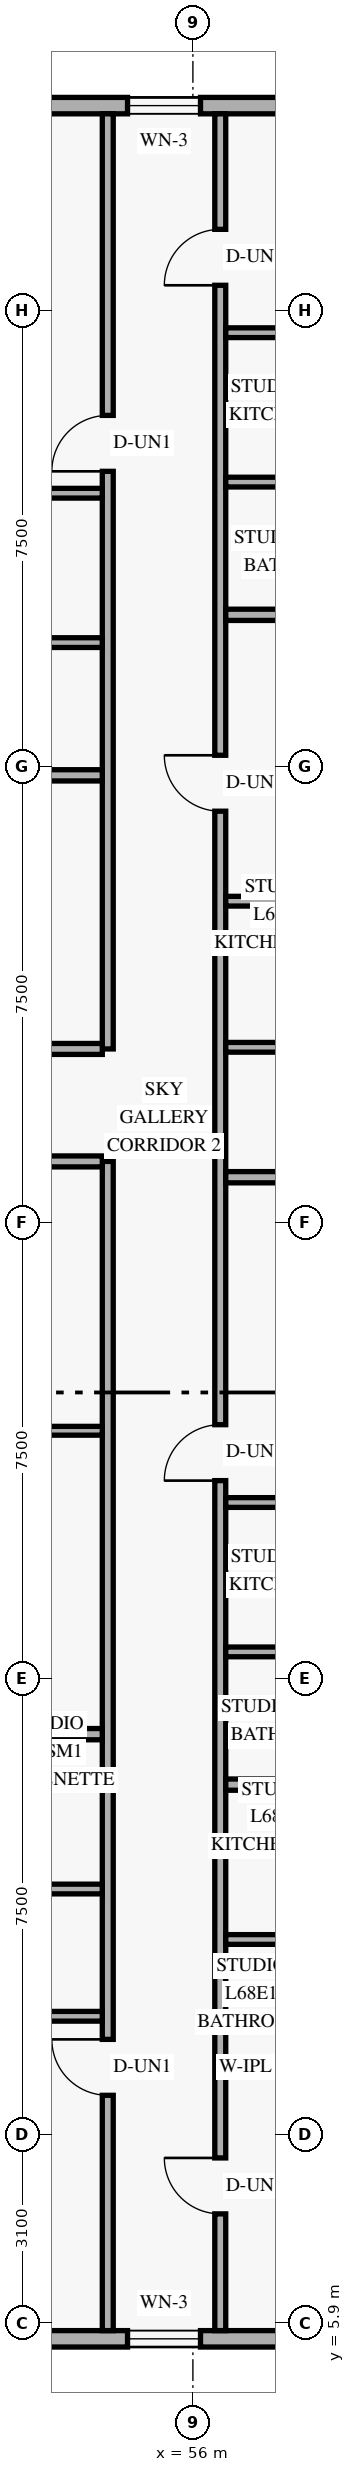
"""IFC4 building model, lengths in metres.
Left out: names, types, materials, properties, quantities, classifications, styles, units other than length and angle.
Written with IfcOpenShell. Run it as: python <this file> out.ifc"""

import sys

from ifc_helpers import new_model, si_unit, direction, frame, frame_2d, origin, place, context, subcontext, project, spatial, rectangle, extrude, element, fill, save


model = new_model("IFC4")
c1 = context("Model", 3, precision=1e-05, world=origin(), true_north=direction((0.0, 1.0)))
c2 = subcontext(c1, "Body", "Model", "MODEL_VIEW")
j1 = project(units=[si_unit("LENGTHUNIT", "METRE"), si_unit("PLANEANGLEUNIT", "RADIAN")], contexts=[c1])
p1 = place(None, origin())
s1 = spatial("IfcSite", under=j1, at=p1, CompositionType="ELEMENT")
p2 = place(p1, origin())
s2 = spatial("IfcBuilding", under=s1, at=p2, CompositionType="ELEMENT")
p3 = place(p2, frame((0.0, 0.0, 260.4)))
s3 = spatial("IfcBuildingStorey", under=s2, at=p3, CompositionType="ELEMENT", Elevation=260.4)
p4 = place(p3, frame((25.82, 5.635, 0.0), z_axis=(0.0, 0.0, 1.0), x_axis=(1.0, 0.0, 0.0)))
e1 = element("IfcWall", 1, at=p4, inside=s3, PredefinedType="SOLIDWALL", context=c2, shape_type="SweptSolid", body=[
    extrude(rectangle(XDim=32.96, YDim=0.27, at=frame_2d((16.48, 0.0))), origin(), (0.0, 0.0, 1.0), 3.36),
])
p5 = place(p4, frame((14.212, 0.0, 0.85)))
e2 = element("IfcOpeningElement", 2, at=p5, cuts=e1, PredefinedType="OPENING", context=c2, shape_type="SweptSolid", body=[
    extrude(rectangle(XDim=1.65, YDim=1.6, at=frame_2d((0.825, 0.8))), frame((0.0, 0.145, 0.0), z_axis=(0.0, -1.0, 0.0), x_axis=(1.0, 0.0, 0.0)), (0.0, 0.0, 1.0), 0.29),
])
p6 = place(p4, frame((25.431, 0.0, 0.85)))
e3 = element("IfcOpeningElement", 3, at=p6, cuts=e1, PredefinedType="OPENING", context=c2, shape_type="SweptSolid", body=[
    extrude(rectangle(XDim=1.65, YDim=1.6, at=frame_2d((0.825, 0.8))), frame((0.0, 0.145, 0.0), z_axis=(0.0, -1.0, 0.0), x_axis=(1.0, 0.0, 0.0)), (0.0, 0.0, 1.0), 0.29),
])
p7 = place(p4, frame((29.105, 0.0, 0.85)))
e4 = element("IfcOpeningElement", 4, at=p7, cuts=e1, PredefinedType="OPENING", context=c2, shape_type="SweptSolid", body=[
    extrude(rectangle(XDim=1.2, YDim=1.5, at=frame_2d((0.6, 0.75))), frame((0.0, 0.145, 0.0), z_axis=(0.0, -1.0, 0.0), x_axis=(1.0, 0.0, 0.0)), (0.0, 0.0, 1.0), 0.29),
])
p8 = place(p3, frame((58.78, 42.365, 0.0), z_axis=(0.0, 0.0, 1.0), x_axis=(-1.0, 0.0, 0.0)))
e5 = element("IfcWall", 5, at=p8, inside=s3, PredefinedType="SOLIDWALL", context=c2, shape_type="SweptSolid", body=[
    extrude(rectangle(XDim=32.96, YDim=0.27, at=frame_2d((16.48, 0.0))), origin(), (0.0, 0.0, 1.0), 3.36),
])
p9 = place(p8, frame((27.665, 0.0, 0.85)))
e6 = element("IfcOpeningElement", 6, at=p9, cuts=e5, PredefinedType="OPENING", context=c2, shape_type="SweptSolid", body=[
    extrude(rectangle(XDim=1.65, YDim=1.6, at=frame_2d((0.825, 0.8))), frame((0.0, 0.145, 0.0), z_axis=(0.0, -1.0, 0.0), x_axis=(1.0, 0.0, 0.0)), (0.0, 0.0, 1.0), 0.29),
])
p10 = place(p8, frame((14.569, 0.0, 0.85)))
e7 = element("IfcOpeningElement", 7, at=p10, cuts=e5, PredefinedType="OPENING", context=c2, shape_type="SweptSolid", body=[
    extrude(rectangle(XDim=1.65, YDim=1.6, at=frame_2d((0.825, 0.8))), frame((0.0, 0.145, 0.0), z_axis=(0.0, -1.0, 0.0), x_axis=(1.0, 0.0, 0.0)), (0.0, 0.0, 1.0), 0.29),
])
p11 = place(p8, frame((2.655, 0.0, 0.85)))
e8 = element("IfcOpeningElement", 8, at=p11, cuts=e5, PredefinedType="OPENING", context=c2, shape_type="SweptSolid", body=[
    extrude(rectangle(XDim=1.2, YDim=1.5, at=frame_2d((0.6, 0.75))), frame((0.0, 0.145, 0.0), z_axis=(0.0, -1.0, 0.0), x_axis=(1.0, 0.0, 0.0)), (0.0, 0.0, 1.0), 0.29),
])
p12 = place(p3, frame((54.6, 5.77, 0.0), z_axis=(0.0, 0.0, 1.0), x_axis=(0.0, 1.0, 0.0)))
e9 = element("IfcWall", 9, at=p12, inside=s3, PredefinedType="STANDARD", context=c2, shape_type="SweptSolid", body=[
    extrude(rectangle(XDim=19.23, YDim=0.18, at=frame_2d((9.615, 0.0))), origin(), (0.0, 0.0, 1.0), 2.803),
])
p13 = place(p12, frame((3.87, 0.0, 0.0)))
e10 = element("IfcOpeningElement", 10, at=p13, cuts=e9, PredefinedType="OPENING", context=c2, shape_type="SweptSolid", body=[
    extrude(rectangle(XDim=0.92, YDim=2.15, at=frame_2d((0.46, 1.075))), frame((0.0, 0.1, 0.0), z_axis=(0.0, -1.0, 0.0), x_axis=(1.0, 0.0, 0.0)), (0.0, 0.0, 1.0), 0.2),
])
p14 = place(p3, frame((54.6, 26.85, 0.0), z_axis=(0.0, 0.0, 1.0), x_axis=(0.0, 1.0, 0.0)))
e11 = element("IfcWall", 11, at=p14, inside=s3, PredefinedType="STANDARD", context=c2, shape_type="SweptSolid", body=[
    extrude(rectangle(XDim=15.38, YDim=0.18, at=frame_2d((7.69, 0.0))), origin(), (0.0, 0.0, 1.0), 2.803),
])
p15 = place(p14, frame((9.5, 0.0, 0.0)))
e12 = element("IfcOpeningElement", 12, at=p15, cuts=e11, PredefinedType="OPENING", context=c2, shape_type="SweptSolid", body=[
    extrude(rectangle(XDim=0.92, YDim=2.15, at=frame_2d((0.46, 1.075))), frame((0.0, 0.1, 0.0), z_axis=(0.0, -1.0, 0.0), x_axis=(1.0, 0.0, 0.0)), (0.0, 0.0, 1.0), 0.2),
])
p16 = place(p3, frame((37.64, 25.0, 0.0), z_axis=(0.0, 0.0, 1.0), x_axis=(1.0, 0.0, 0.0)))
e13 = element("IfcWall", 13, at=p16, inside=s3, PredefinedType="STANDARD", context=c2, shape_type="SweptSolid", body=[
    extrude(rectangle(XDim=16.87, YDim=0.18, at=frame_2d((8.435, 0.0))), origin(), (0.0, 0.0, 1.0), 2.803),
])
p17 = place(p16, frame((0.32, 0.0, 0.0)))
e14 = element("IfcOpeningElement", 14, at=p17, cuts=e13, PredefinedType="OPENING", context=c2, shape_type="SweptSolid", body=[
    extrude(rectangle(XDim=0.92, YDim=2.15, at=frame_2d((0.46, 1.075))), frame((0.0, 0.1, 0.0), z_axis=(0.0, -1.0, 0.0), x_axis=(1.0, 0.0, 0.0)), (0.0, 0.0, 1.0), 0.2),
])
p18 = place(p3, frame((37.64, 26.85, 0.0), z_axis=(0.0, 0.0, 1.0), x_axis=(1.0, 0.0, 0.0)))
e15 = element("IfcWall", 15, at=p18, inside=s3, PredefinedType="STANDARD", context=c2, shape_type="SweptSolid", body=[
    extrude(rectangle(XDim=16.87, YDim=0.18, at=frame_2d((8.435, 0.0))), origin(), (0.0, 0.0, 1.0), 2.803),
])
p19 = place(p18, frame((7.975, 0.0, 0.0)))
e16 = element("IfcOpeningElement", 16, at=p19, cuts=e15, PredefinedType="OPENING", context=c2, shape_type="SweptSolid", body=[
    extrude(rectangle(XDim=0.92, YDim=2.15, at=frame_2d((0.46, 1.075))), frame((0.0, 0.1, 0.0), z_axis=(0.0, -1.0, 0.0), x_axis=(1.0, 0.0, 0.0)), (0.0, 0.0, 1.0), 0.2),
])
p20 = place(p3, frame((56.45, 5.77, 0.0), z_axis=(0.0, 0.0, 1.0), x_axis=(0.0, 1.0, 0.0)))
e17 = element("IfcWall", 17, at=p20, inside=s3, PredefinedType="STANDARD", context=c2, shape_type="SweptSolid", body=[
    extrude(rectangle(XDim=36.46, YDim=0.18, at=frame_2d((18.23, 0.0))), origin(), (0.0, 0.0, 1.0), 2.803),
])
p21 = place(p20, frame((1.92, 0.0, 0.0)))
e18 = element("IfcOpeningElement", 18, at=p21, cuts=e17, PredefinedType="OPENING", context=c2, shape_type="SweptSolid", body=[
    extrude(rectangle(XDim=0.92, YDim=2.15, at=frame_2d((0.46, 1.075))), frame((0.0, 0.1, 0.0), z_axis=(0.0, -1.0, 0.0), x_axis=(1.0, 0.0, 0.0)), (0.0, 0.0, 1.0), 0.2),
])
p22 = place(p20, frame((13.98, 0.0, 0.0)))
e19 = element("IfcOpeningElement", 19, at=p22, cuts=e17, PredefinedType="OPENING", context=c2, shape_type="SweptSolid", body=[
    extrude(rectangle(XDim=0.92, YDim=2.15, at=frame_2d((0.46, 1.075))), frame((0.0, 0.1, 0.0), z_axis=(0.0, -1.0, 0.0), x_axis=(1.0, 0.0, 0.0)), (0.0, 0.0, 1.0), 0.2),
])
p23 = place(p20, frame((24.99, 0.0, 0.0)))
e20 = element("IfcOpeningElement", 20, at=p23, cuts=e17, PredefinedType="OPENING", context=c2, shape_type="SweptSolid", body=[
    extrude(rectangle(XDim=0.92, YDim=2.15, at=frame_2d((0.46, 1.075))), frame((0.0, 0.1, 0.0), z_axis=(0.0, -1.0, 0.0), x_axis=(1.0, 0.0, 0.0)), (0.0, 0.0, 1.0), 0.2),
])
p24 = place(p20, frame((33.64, 0.0, 0.0)))
e21 = element("IfcOpeningElement", 21, at=p24, cuts=e17, PredefinedType="OPENING", context=c2, shape_type="SweptSolid", body=[
    extrude(rectangle(XDim=0.92, YDim=2.15, at=frame_2d((0.46, 1.075))), frame((0.0, 0.1, 0.0), z_axis=(0.0, -1.0, 0.0), x_axis=(1.0, 0.0, 0.0)), (0.0, 0.0, 1.0), 0.2),
])
p25 = place(p3, frame((56.54, 10.11, 0.0), z_axis=(0.0, 0.0, 1.0), x_axis=(1.0, 0.0, 0.0)))
e22 = element("IfcWall", 22, at=p25, inside=s3, PredefinedType="PLUMBINGWALL", context=c2, shape_type="SweptSolid", body=[
    extrude(rectangle(XDim=2.606, YDim=0.16, at=frame_2d((1.303, 0.0))), origin(), (0.0, 0.0, 1.0), 2.879),
])
p26 = place(p3, frame((56.54, 12.203, 0.0), z_axis=(0.0, 0.0, 1.0), x_axis=(1.0, 0.0, 0.0)))
e23 = element("IfcWall", 23, at=p26, inside=s3, PredefinedType="PLUMBINGWALL", context=c2, shape_type="SweptSolid", body=[
    extrude(rectangle(XDim=2.446, YDim=0.16, at=frame_2d((1.223, 0.0))), origin(), (0.0, 0.0, 1.0), 2.879),
])
p27 = place(p3, frame((56.54, 14.75, 0.0), z_axis=(0.0, 0.0, 1.0), x_axis=(1.0, 0.0, 0.0)))
e24 = element("IfcWall", 24, at=p27, inside=s3, PredefinedType="PARTITIONING", context=c2, shape_type="SweptSolid", body=[
    extrude(rectangle(XDim=5.59, YDim=0.185, at=frame_2d((2.795, 0.0))), origin(), (0.0, 0.0, 1.0), 2.879),
])
p28 = place(p3, frame((56.54, 19.39, 0.0), z_axis=(0.0, 0.0, 1.0), x_axis=(1.0, 0.0, 0.0)))
e25 = element("IfcWall", 25, at=p28, inside=s3, PredefinedType="PLUMBINGWALL", context=c2, shape_type="SweptSolid", body=[
    extrude(rectangle(XDim=3.62, YDim=0.16, at=frame_2d((1.81, 0.0))), origin(), (0.0, 0.0, 1.0), 2.879),
])
p29 = place(p3, frame((56.54, 16.933, 0.0), z_axis=(0.0, 0.0, 1.0), x_axis=(1.0, 0.0, 0.0)))
e26 = element("IfcWall", 26, at=p29, inside=s3, PredefinedType="PLUMBINGWALL", context=c2, shape_type="SweptSolid", body=[
    extrude(rectangle(XDim=3.46, YDim=0.16, at=frame_2d((1.73, 0.0))), origin(), (0.0, 0.0, 1.0), 2.879),
])
p30 = place(p3, frame((56.54, 24.74, 0.0), z_axis=(0.0, 0.0, 1.0), x_axis=(1.0, 0.0, 0.0)))
e27 = element("IfcWall", 27, at=p30, inside=s3, PredefinedType="PARTITIONING", context=c2, shape_type="SweptSolid", body=[
    extrude(rectangle(XDim=5.59, YDim=0.185, at=frame_2d((2.795, 0.0))), origin(), (0.0, 0.0, 1.0), 2.879),
])
p31 = place(p3, frame((56.54, 29.28, 0.0), z_axis=(0.0, 0.0, 1.0), x_axis=(1.0, 0.0, 0.0)))
e28 = element("IfcWall", 28, at=p31, inside=s3, PredefinedType="PLUMBINGWALL", context=c2, shape_type="SweptSolid", body=[
    extrude(rectangle(XDim=2.758, YDim=0.16, at=frame_2d((1.379, 0.0))), origin(), (0.0, 0.0, 1.0), 2.879),
])
p32 = place(p3, frame((56.54, 26.877, 0.0), z_axis=(0.0, 0.0, 1.0), x_axis=(1.0, 0.0, 0.0)))
e29 = element("IfcWall", 29, at=p32, inside=s3, PredefinedType="PLUMBINGWALL", context=c2, shape_type="SweptSolid", body=[
    extrude(rectangle(XDim=2.598, YDim=0.16, at=frame_2d((1.299, 0.0))), origin(), (0.0, 0.0, 1.0), 2.879),
])
p33 = place(p3, frame((56.54, 33.99, 0.0), z_axis=(0.0, 0.0, 1.0), x_axis=(1.0, 0.0, 0.0)))
e30 = element("IfcWall", 30, at=p33, inside=s3, PredefinedType="PARTITIONING", context=c2, shape_type="SweptSolid", body=[
    extrude(rectangle(XDim=5.59, YDim=0.185, at=frame_2d((2.795, 0.0))), origin(), (0.0, 0.0, 1.0), 2.879),
])
p34 = place(p3, frame((56.54, 38.63, 0.0), z_axis=(0.0, 0.0, 1.0), x_axis=(1.0, 0.0, 0.0)))
e31 = element("IfcWall", 31, at=p34, inside=s3, PredefinedType="PLUMBINGWALL", context=c2, shape_type="SweptSolid", body=[
    extrude(rectangle(XDim=3.62, YDim=0.16, at=frame_2d((1.81, 0.0))), origin(), (0.0, 0.0, 1.0), 2.803),
])
p35 = place(p3, frame((56.54, 36.173, 0.0), z_axis=(0.0, 0.0, 1.0), x_axis=(1.0, 0.0, 0.0)))
e32 = element("IfcWall", 32, at=p35, inside=s3, PredefinedType="PLUMBINGWALL", context=c2, shape_type="SweptSolid", body=[
    extrude(rectangle(XDim=3.46, YDim=0.16, at=frame_2d((1.73, 0.0))), origin(), (0.0, 0.0, 1.0), 2.879),
])
p36 = place(p3, frame((37.64, 15.58, 0.0), z_axis=(0.0, 0.0, 1.0), x_axis=(1.0, 0.0, 0.0)))
e33 = element("IfcWall", 33, at=p36, inside=s3, PredefinedType="PARTITIONING", context=c2, shape_type="SweptSolid", body=[
    extrude(rectangle(XDim=16.87, YDim=0.185, at=frame_2d((8.435, 0.0))), origin(), (0.0, 0.0, 1.0), 2.803),
])
p37 = place(p3, frame((51.98, 10.94, 0.0), z_axis=(0.0, 0.0, 1.0), x_axis=(1.0, 0.0, 0.0)))
e34 = element("IfcWall", 34, at=p37, inside=s3, PredefinedType="PLUMBINGWALL", context=c2, shape_type="SweptSolid", body=[
    extrude(rectangle(XDim=2.53, YDim=0.16, at=frame_2d((1.265, 0.0))), origin(), (0.0, 0.0, 1.0), 3.36),
])
p38 = place(p3, frame((52.14, 13.033, 0.0), z_axis=(0.0, 0.0, 1.0), x_axis=(1.0, 0.0, 0.0)))
e35 = element("IfcWall", 35, at=p38, inside=s3, PredefinedType="PLUMBINGWALL", context=c2, shape_type="SweptSolid", body=[
    extrude(rectangle(XDim=2.37, YDim=0.16, at=frame_2d((1.185, 0.0))), origin(), (0.0, 0.0, 1.0), 3.36),
])
p39 = place(p3, frame((51.29, 20.57, 0.0), z_axis=(0.0, 0.0, 1.0), x_axis=(1.0, 0.0, 0.0)))
e36 = element("IfcWall", 36, at=p39, inside=s3, PredefinedType="PARTITIONING", context=c2, shape_type="SweptSolid", body=[
    extrude(rectangle(XDim=3.22, YDim=0.145, at=frame_2d((1.61, 0.0))), origin(), (0.0, 0.0, 1.0), 3.36),
])
p40 = place(p3, frame((38.173, 31.35, 0.0), z_axis=(0.0, 0.0, 1.0), x_axis=(1.0, 0.0, 0.0)))
e37 = element("IfcWall", 37, at=p40, inside=s3, PredefinedType="PARTITIONING", context=c2, shape_type="SweptSolid", body=[
    extrude(rectangle(XDim=16.337, YDim=0.185, at=frame_2d((8.169, 0.0))), origin(), (0.0, 0.0, 1.0), 2.803),
])
p41 = place(p3, frame((51.904, 35.99, 0.0), z_axis=(0.0, 0.0, 1.0), x_axis=(1.0, 0.0, 0.0)))
e38 = element("IfcWall", 38, at=p41, inside=s3, PredefinedType="PLUMBINGWALL", context=c2, shape_type="SweptSolid", body=[
    extrude(rectangle(XDim=2.606, YDim=0.16, at=frame_2d((1.303, 0.0))), origin(), (0.0, 0.0, 1.0), 3.36),
])
p42 = place(p3, frame((52.064, 33.533, 0.0), z_axis=(0.0, 0.0, 1.0), x_axis=(1.0, 0.0, 0.0)))
e39 = element("IfcWall", 39, at=p42, inside=s3, PredefinedType="PLUMBINGWALL", context=c2, shape_type="SweptSolid", body=[
    extrude(rectangle(XDim=2.446, YDim=0.16, at=frame_2d((1.223, 0.0))), origin(), (0.0, 0.0, 1.0), 3.36),
])
p43 = place(p7, origin())
e40 = element("IfcWindow", 40, at=p43, inside=s3, PartitioningType="SINGLE_PANEL", PredefinedType="WINDOW", context=c2, shape_type="SweptSolid", body=[
    extrude(rectangle(XDim=1.2, YDim=1.5, at=frame_2d((0.6, 0.75))), frame((0.0, 0.03, 0.0), z_axis=(0.0, -1.0, 0.0), x_axis=(1.0, 0.0, 0.0)), (0.0, 0.0, 1.0), 0.06),
])
fill(e4, e40)
p44 = place(p11, origin())
e41 = element("IfcWindow", 41, at=p44, inside=s3, PartitioningType="SINGLE_PANEL", PredefinedType="WINDOW", context=c2, shape_type="SweptSolid", body=[
    extrude(rectangle(XDim=1.2, YDim=1.5, at=frame_2d((0.6, 0.75))), frame((0.0, 0.03, 0.0), z_axis=(0.0, -1.0, 0.0), x_axis=(1.0, 0.0, 0.0)), (0.0, 0.0, 1.0), 0.06),
])
fill(e8, e41)
p45 = place(p21, origin())
e42 = element("IfcDoor", 42, at=p45, inside=s3, OperationType="SINGLE_SWING_RIGHT", PredefinedType="DOOR", context=c2, shape_type="SweptSolid", body=[
    extrude(rectangle(XDim=0.92, YDim=2.15, at=frame_2d((0.46, 1.075))), frame((0.0, 0.025, 0.0), z_axis=(0.0, -1.0, 0.0), x_axis=(1.0, 0.0, 0.0)), (0.0, 0.0, 1.0), 0.05),
])
fill(e18, e42)
p46 = place(p22, origin())
e43 = element("IfcDoor", 43, at=p46, inside=s3, OperationType="SINGLE_SWING_LEFT", PredefinedType="DOOR", context=c2, shape_type="SweptSolid", body=[
    extrude(rectangle(XDim=0.92, YDim=2.15, at=frame_2d((0.46, 1.075))), frame((0.0, 0.025, 0.0), z_axis=(0.0, -1.0, 0.0), x_axis=(1.0, 0.0, 0.0)), (0.0, 0.0, 1.0), 0.05),
])
fill(e19, e43)
p47 = place(p23, origin())
e44 = element("IfcDoor", 44, at=p47, inside=s3, OperationType="SINGLE_SWING_RIGHT", PredefinedType="DOOR", context=c2, shape_type="SweptSolid", body=[
    extrude(rectangle(XDim=0.92, YDim=2.15, at=frame_2d((0.46, 1.075))), frame((0.0, 0.025, 0.0), z_axis=(0.0, -1.0, 0.0), x_axis=(1.0, 0.0, 0.0)), (0.0, 0.0, 1.0), 0.05),
])
fill(e20, e44)
p48 = place(p24, origin())
e45 = element("IfcDoor", 45, at=p48, inside=s3, OperationType="SINGLE_SWING_LEFT", PredefinedType="DOOR", context=c2, shape_type="SweptSolid", body=[
    extrude(rectangle(XDim=0.92, YDim=2.15, at=frame_2d((0.46, 1.075))), frame((0.0, 0.025, 0.0), z_axis=(0.0, -1.0, 0.0), x_axis=(1.0, 0.0, 0.0)), (0.0, 0.0, 1.0), 0.05),
])
fill(e21, e45)
p49 = place(p13, origin())
e46 = element("IfcDoor", 46, at=p49, inside=s3, OperationType="SINGLE_SWING_RIGHT", PredefinedType="DOOR", context=c2, shape_type="SweptSolid", body=[
    extrude(rectangle(XDim=0.92, YDim=2.15, at=frame_2d((0.46, 1.075))), frame((0.0, 0.025, 0.0), z_axis=(0.0, -1.0, 0.0), x_axis=(1.0, 0.0, 0.0)), (0.0, 0.0, 1.0), 0.05),
])
fill(e10, e46)
p50 = place(p15, origin())
e47 = element("IfcDoor", 47, at=p50, inside=s3, OperationType="SINGLE_SWING_LEFT", PredefinedType="DOOR", context=c2, shape_type="SweptSolid", body=[
    extrude(rectangle(XDim=0.92, YDim=2.15, at=frame_2d((0.46, 1.075))), frame((0.0, 0.025, 0.0), z_axis=(0.0, -1.0, 0.0), x_axis=(1.0, 0.0, 0.0)), (0.0, 0.0, 1.0), 0.05),
])
fill(e12, e47)
save(model, sys.argv[1])
